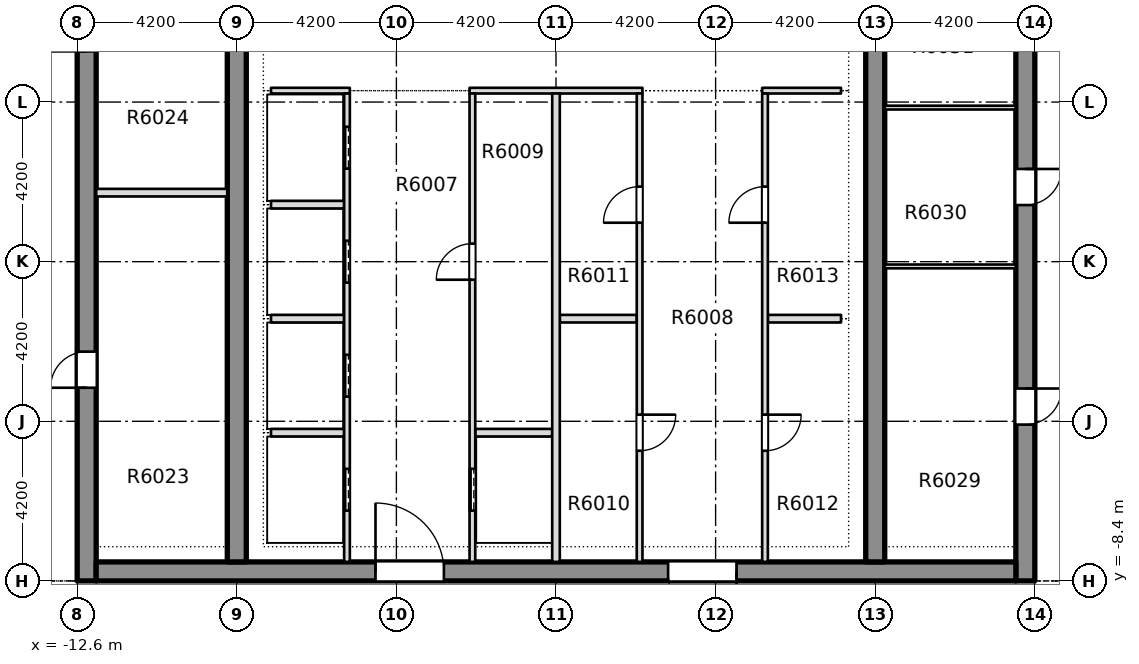
"""IFC4 building model, lengths in metres.
Left out: names, types, materials, properties, quantities, classifications, styles, units other than length and angle.
Written with IfcOpenShell. Run it as: python <this file> out.ifc"""

import sys

from ifc_helpers import new_model, si_unit, direction, frame, frame_2d, origin, place, context, subcontext, project, spatial, rectangle, extrude, element, fill, save


model = new_model("IFC4")
c1 = context("Model", 3, precision=1e-05, world=origin(), true_north=direction((0.0, 1.0)))
c2 = subcontext(c1, "Body", "Model", "MODEL_VIEW")
j1 = project(units=[si_unit("LENGTHUNIT", "METRE"), si_unit("PLANEANGLEUNIT", "RADIAN")], contexts=[c1])
p1 = place(None, origin())
s1 = spatial("IfcSite", under=j1, at=p1, CompositionType="ELEMENT")
p2 = place(p1, origin())
s2 = spatial("IfcBuilding", under=s1, at=p2, CompositionType="ELEMENT")
p3 = place(p2, frame((0.0, 0.0, 230.35)))
s3 = spatial("IfcBuildingStorey", under=s2, at=p3, CompositionType="ELEMENT", Elevation=230.35)
p4 = place(p3, frame((12.35, -8.4, -0.4), z_axis=(0.0, 0.0, 1.0), x_axis=(0.0, 1.0, 0.0)))
e1 = element("IfcWall", 1, at=p4, inside=s3, PredefinedType="SHEAR", context=c2, shape_type="SweptSolid", body=[
    extrude(rectangle(XDim=30.15, YDim=0.5, at=frame_2d((15.075, 0.0))), origin(), (0.0, 0.0, 1.0), 3.45),
])
p5 = place(p4, frame((4.113, 0.0, 0.4)))
e2 = element("IfcOpeningElement", 2, at=p5, cuts=e1, PredefinedType="OPENING", context=c2, shape_type="SweptSolid", body=[
    extrude(rectangle(XDim=0.95, YDim=2.1, at=frame_2d((0.475, 1.05))), frame((0.0, 0.26, 0.0), z_axis=(0.0, -1.0, 0.0), x_axis=(1.0, 0.0, 0.0)), (0.0, 0.0, 1.0), 0.52),
])
p6 = place(p4, frame((9.89, 0.0, 0.4)))
e3 = element("IfcOpeningElement", 3, at=p6, cuts=e1, PredefinedType="OPENING", context=c2, shape_type="SweptSolid", body=[
    extrude(rectangle(XDim=0.95, YDim=2.1, at=frame_2d((0.475, 1.05))), frame((0.0, 0.26, 0.0), z_axis=(0.0, -1.0, 0.0), x_axis=(1.0, 0.0, 0.0)), (0.0, 0.0, 1.0), 0.52),
])
p7 = place(p4, frame((15.052, 0.0, 0.4)))
e4 = element("IfcOpeningElement", 4, at=p7, cuts=e1, PredefinedType="OPENING", context=c2, shape_type="SweptSolid", body=[
    extrude(rectangle(XDim=0.95, YDim=2.1, at=frame_2d((0.475, 1.05))), frame((0.0, 0.26, 0.0), z_axis=(0.0, -1.0, 0.0), x_axis=(1.0, 0.0, 0.0)), (0.0, 0.0, 1.0), 0.52),
])
p8 = place(p4, frame((22.144, 0.0, 0.4)))
e5 = element("IfcOpeningElement", 5, at=p8, cuts=e1, PredefinedType="OPENING", context=c2, shape_type="SweptSolid", body=[
    extrude(rectangle(XDim=0.95, YDim=2.1, at=frame_2d((0.475, 1.05))), frame((0.0, 0.26, 0.0), z_axis=(0.0, -1.0, 0.0), x_axis=(1.0, 0.0, 0.0)), (0.0, 0.0, 1.0), 0.52),
])
p9 = place(p4, frame((24.998, 0.0, 0.4)))
e6 = element("IfcOpeningElement", 6, at=p9, cuts=e1, PredefinedType="OPENING", context=c2, shape_type="SweptSolid", body=[
    extrude(rectangle(XDim=0.95, YDim=2.1, at=frame_2d((0.475, 1.05))), frame((0.0, 0.26, 0.0), z_axis=(0.0, -1.0, 0.0), x_axis=(1.0, 0.0, 0.0)), (0.0, 0.0, 1.0), 0.52),
])
p10 = place(p4, frame((27.605, 0.0, 0.4)))
e7 = element("IfcOpeningElement", 7, at=p10, cuts=e1, PredefinedType="OPENING", context=c2, shape_type="SweptSolid", body=[
    extrude(rectangle(XDim=0.95, YDim=2.1, at=frame_2d((0.475, 1.05))), frame((0.0, 0.26, 0.0), z_axis=(0.0, -1.0, 0.0), x_axis=(1.0, 0.0, 0.0)), (0.0, 0.0, 1.0), 0.52),
])
p11 = place(p4, frame((19.3, 0.0, 0.4)))
e8 = element("IfcOpeningElement", 8, at=p11, cuts=e1, PredefinedType="OPENING", context=c2, shape_type="SweptSolid", body=[
    extrude(rectangle(XDim=1.2, YDim=2.1, at=frame_2d((0.6, 1.05))), frame((0.0, 0.26, 0.0), z_axis=(0.0, -1.0, 0.0), x_axis=(1.0, 0.0, 0.0)), (0.0, 0.0, 1.0), 0.52),
])
p12 = place(p3, frame((-12.35, -8.4, -0.4), z_axis=(0.0, 0.0, 1.0), x_axis=(0.0, 1.0, 0.0)))
e9 = element("IfcWall", 9, at=p12, inside=s3, PredefinedType="SHEAR", context=c2, shape_type="SweptSolid", body=[
    extrude(rectangle(XDim=30.15, YDim=0.5, at=frame_2d((15.075, 0.0))), origin(), (0.0, 0.0, 1.0), 3.45),
])
p13 = place(p12, frame((5.083, 0.0, 0.4)))
e10 = element("IfcOpeningElement", 10, at=p13, cuts=e9, PredefinedType="OPENING", context=c2, shape_type="SweptSolid", body=[
    extrude(rectangle(XDim=0.95, YDim=2.1, at=frame_2d((0.475, 1.05))), frame((0.0, 0.26, 0.0), z_axis=(0.0, -1.0, 0.0), x_axis=(1.0, 0.0, 0.0)), (0.0, 0.0, 1.0), 0.52),
])
p14 = place(p12, frame((13.933, 0.0, 0.4)))
e11 = element("IfcOpeningElement", 11, at=p14, cuts=e9, PredefinedType="OPENING", context=c2, shape_type="SweptSolid", body=[
    extrude(rectangle(XDim=0.95, YDim=2.1, at=frame_2d((0.475, 1.05))), frame((0.0, 0.26, 0.0), z_axis=(0.0, -1.0, 0.0), x_axis=(1.0, 0.0, 0.0)), (0.0, 0.0, 1.0), 0.52),
])
p15 = place(p12, frame((22.719, 0.0, 0.4)))
e12 = element("IfcOpeningElement", 12, at=p15, cuts=e9, PredefinedType="OPENING", context=c2, shape_type="SweptSolid", body=[
    extrude(rectangle(XDim=0.95, YDim=2.1, at=frame_2d((0.475, 1.05))), frame((0.0, 0.26, 0.0), z_axis=(0.0, -1.0, 0.0), x_axis=(1.0, 0.0, 0.0)), (0.0, 0.0, 1.0), 0.52),
])
p16 = place(p12, frame((25.506, 0.0, 0.4)))
e13 = element("IfcOpeningElement", 13, at=p16, cuts=e9, PredefinedType="OPENING", context=c2, shape_type="SweptSolid", body=[
    extrude(rectangle(XDim=0.95, YDim=2.1, at=frame_2d((0.475, 1.05))), frame((0.0, 0.26, 0.0), z_axis=(0.0, -1.0, 0.0), x_axis=(1.0, 0.0, 0.0)), (0.0, 0.0, 1.0), 0.52),
])
p17 = place(p12, frame((27.537, 0.0, 0.4)))
e14 = element("IfcOpeningElement", 14, at=p17, cuts=e9, PredefinedType="OPENING", context=c2, shape_type="SweptSolid", body=[
    extrude(rectangle(XDim=0.95, YDim=2.1, at=frame_2d((0.475, 1.05))), frame((0.0, 0.26, 0.0), z_axis=(0.0, -1.0, 0.0), x_axis=(1.0, 0.0, 0.0)), (0.0, 0.0, 1.0), 0.52),
])
p18 = place(p12, frame((19.3, 0.0, 0.4)))
e15 = element("IfcOpeningElement", 15, at=p18, cuts=e9, PredefinedType="OPENING", context=c2, shape_type="SweptSolid", body=[
    extrude(rectangle(XDim=1.2, YDim=2.1, at=frame_2d((0.6, 1.05))), frame((0.0, 0.26, 0.0), z_axis=(0.0, -1.0, 0.0), x_axis=(1.0, 0.0, 0.0)), (0.0, 0.0, 1.0), 0.52),
])
p19 = place(p3, frame((-12.1, -8.15, -0.4), z_axis=(0.0, 0.0, 1.0), x_axis=(1.0, 0.0, 0.0)))
e16 = element("IfcWall", 16, at=p19, inside=s3, PredefinedType="SHEAR", context=c2, shape_type="SweptSolid", body=[
    extrude(rectangle(XDim=24.2, YDim=0.5, at=frame_2d((12.1, 0.0))), origin(), (0.0, 0.0, 1.0), 3.45),
])
p20 = place(p19, frame((7.35, 0.0, 0.4)))
e17 = element("IfcOpeningElement", 17, at=p20, cuts=e16, PredefinedType="OPENING", context=c2, shape_type="SweptSolid", body=[
    extrude(rectangle(XDim=1.8, YDim=2.1, at=frame_2d((0.9, 1.05))), frame((0.0, 0.26, 0.0), z_axis=(0.0, -1.0, 0.0), x_axis=(1.0, 0.0, 0.0)), (0.0, 0.0, 1.0), 0.52),
])
p21 = place(p19, frame((15.05, 0.0, 0.4)))
e18 = element("IfcOpeningElement", 18, at=p21, cuts=e16, PredefinedType="OPENING", context=c2, shape_type="SweptSolid", body=[
    extrude(rectangle(XDim=1.8, YDim=2.1, at=frame_2d((0.9, 1.05))), frame((0.0, 0.26, 0.0), z_axis=(0.0, -1.0, 0.0), x_axis=(1.0, 0.0, 0.0)), (0.0, 0.0, 1.0), 0.52),
])
p22 = place(p3, frame((-8.4, -7.9, -0.4), z_axis=(0.0, 0.0, 1.0), x_axis=(0.0, 1.0, 0.0)))
e19 = element("IfcWall", 19, at=p22, inside=s3, PredefinedType="SHEAR", context=c2, shape_type="SweptSolid", body=[
    extrude(rectangle(XDim=29.15, YDim=0.5, at=frame_2d((14.575, 0.0))), origin(), (0.0, 0.0, 1.0), 3.45),
])
p23 = place(p22, frame((18.8, 0.0, 0.4)))
e20 = element("IfcOpeningElement", 20, at=p23, cuts=e19, PredefinedType="OPENING", context=c2, shape_type="SweptSolid", body=[
    extrude(rectangle(XDim=1.2, YDim=2.1, at=frame_2d((0.6, 1.05))), frame((0.0, 0.26, 0.0), z_axis=(0.0, -1.0, 0.0), x_axis=(1.0, 0.0, 0.0)), (0.0, 0.0, 1.0), 0.52),
])
p24 = place(p3, frame((8.4, -7.9, -0.4), z_axis=(0.0, 0.0, 1.0), x_axis=(0.0, 1.0, 0.0)))
e21 = element("IfcWall", 21, at=p24, inside=s3, PredefinedType="SHEAR", context=c2, shape_type="SweptSolid", body=[
    extrude(rectangle(XDim=29.15, YDim=0.5, at=frame_2d((14.575, 0.0))), origin(), (0.0, 0.0, 1.0), 3.45),
])
p25 = place(p24, frame((18.8, 0.0, 0.4)))
e22 = element("IfcOpeningElement", 22, at=p25, cuts=e21, PredefinedType="OPENING", context=c2, shape_type="SweptSolid", body=[
    extrude(rectangle(XDim=1.2, YDim=2.1, at=frame_2d((0.6, 1.05))), frame((0.0, 0.26, 0.0), z_axis=(0.0, -1.0, 0.0), x_axis=(1.0, 0.0, 0.0)), (0.0, 0.0, 1.0), 0.52),
])
p26 = place(p3, frame((-7.5, -4.5, 0.0), z_axis=(0.0, 0.0, 1.0), x_axis=(1.0, 0.0, 0.0)))
e23 = element("IfcWall", 23, at=p26, inside=s3, PredefinedType="PARTITIONING", context=c2, shape_type="SweptSolid", body=[
    extrude(rectangle(XDim=1.925, YDim=0.2, at=frame_2d((0.962, 0.0))), origin(), (0.0, 0.0, 1.0), 3.05),
])
p27 = place(p3, frame((-2.125, -4.5, 0.0), z_axis=(0.0, 0.0, 1.0), x_axis=(1.0, 0.0, 0.0)))
e24 = element("IfcWall", 24, at=p27, inside=s3, PredefinedType="PARTITIONING", context=c2, shape_type="SweptSolid", body=[
    extrude(rectangle(XDim=2.025, YDim=0.2, at=frame_2d((1.012, 0.0))), origin(), (0.0, 0.0, 1.0), 3.05),
])
p28 = place(p3, frame((-7.5, -1.5, 0.0), z_axis=(0.0, 0.0, 1.0), x_axis=(1.0, 0.0, 0.0)))
e25 = element("IfcWall", 25, at=p28, inside=s3, PredefinedType="PARTITIONING", context=c2, shape_type="SweptSolid", body=[
    extrude(rectangle(XDim=1.925, YDim=0.2, at=frame_2d((0.962, 0.0))), origin(), (0.0, 0.0, 1.0), 3.05),
])
p29 = place(p3, frame((0.1, -1.5, 0.0), z_axis=(0.0, 0.0, 1.0), x_axis=(1.0, 0.0, 0.0)))
e26 = element("IfcWall", 26, at=p29, inside=s3, PredefinedType="PARTITIONING", context=c2, shape_type="SweptSolid", body=[
    extrude(rectangle(XDim=2.025, YDim=0.2, at=frame_2d((1.012, 0.0))), origin(), (0.0, 0.0, 1.0), 3.05),
])
for number, where, z_axis, x_axis in (
    (27, (5.575, -1.5, 0.0), (0.0, 0.0, 1.0), (1.0, 0.0, 0.0)),
    (28, (-7.5, 1.5, 0.0), (0.0, 0.0, 1.0), (1.0, 0.0, 0.0)),
):
    element("IfcWall", number, at=place(p3, frame(where, z_axis=z_axis, x_axis=x_axis)), inside=s3, PredefinedType="PARTITIONING", context=c2, shape_type="SweptSolid", body=[
        extrude(rectangle(XDim=1.925, YDim=0.2, at=frame_2d((0.962, 0.0))), origin(), (0.0, 0.0, 1.0), 3.05),
    ])
p30 = place(p3, frame((-7.5, 4.5, 0.0), z_axis=(0.0, 0.0, 1.0), x_axis=(1.0, 0.0, 0.0)))
e29 = element("IfcWall", 29, at=p30, inside=s3, PredefinedType="PARTITIONING", context=c2, shape_type="SweptSolid", body=[
    extrude(rectangle(XDim=2.075, YDim=0.15, at=frame_2d((1.038, 0.0))), origin(), (0.0, 0.0, 1.0), 3.05),
])
p31 = place(p3, frame((-2.275, 4.5, 0.0), z_axis=(0.0, 0.0, 1.0), x_axis=(1.0, 0.0, 0.0)))
e30 = element("IfcWall", 30, at=p31, inside=s3, PredefinedType="PARTITIONING", context=c2, shape_type="SweptSolid", body=[
    extrude(rectangle(XDim=4.55, YDim=0.15, at=frame_2d((2.275, 0.0))), origin(), (0.0, 0.0, 1.0), 3.05),
])
p32 = place(p3, frame((5.425, 4.5, 0.0), z_axis=(0.0, 0.0, 1.0), x_axis=(1.0, 0.0, 0.0)))
e31 = element("IfcWall", 31, at=p32, inside=s3, PredefinedType="PARTITIONING", context=c2, shape_type="SweptSolid", body=[
    extrude(rectangle(XDim=2.075, YDim=0.15, at=frame_2d((1.038, 0.0))), origin(), (0.0, 0.0, 1.0), 3.05),
])
p33 = place(p3, frame((-5.5, -7.899, 0.0), z_axis=(0.0, 0.0, 1.0), x_axis=(0.0, 1.0, 0.0)))
e32 = element("IfcWall", 32, at=p33, inside=s3, PredefinedType="PARTITIONING", context=c2, shape_type="SweptSolid", body=[
    extrude(rectangle(XDim=12.324, YDim=0.15, at=frame_2d((6.162, 0.0))), origin(), (0.0, 0.0, 1.0), 3.05),
])
p34 = place(p33, frame((1.349, 0.0, 0.0)))
e33 = element("IfcOpeningElement", 33, at=p34, cuts=e32, PredefinedType="OPENING", context=c2, shape_type="SweptSolid", body=[
    extrude(rectangle(XDim=1.1, YDim=2.1, at=frame_2d((0.55, 1.05))), frame((0.0, 0.085, 0.0), z_axis=(0.0, -1.0, 0.0), x_axis=(1.0, 0.0, 0.0)), (0.0, 0.0, 1.0), 0.17),
])
p35 = place(p33, frame((4.349, 0.0, 0.0)))
e34 = element("IfcOpeningElement", 34, at=p35, cuts=e32, PredefinedType="OPENING", context=c2, shape_type="SweptSolid", body=[
    extrude(rectangle(XDim=1.1, YDim=2.1, at=frame_2d((0.55, 1.05))), frame((0.0, 0.085, 0.0), z_axis=(0.0, -1.0, 0.0), x_axis=(1.0, 0.0, 0.0)), (0.0, 0.0, 1.0), 0.17),
])
p36 = place(p33, frame((7.349, 0.0, 0.0)))
e35 = element("IfcOpeningElement", 35, at=p36, cuts=e32, PredefinedType="OPENING", context=c2, shape_type="SweptSolid", body=[
    extrude(rectangle(XDim=1.1, YDim=2.1, at=frame_2d((0.55, 1.05))), frame((0.0, 0.085, 0.0), z_axis=(0.0, -1.0, 0.0), x_axis=(1.0, 0.0, 0.0)), (0.0, 0.0, 1.0), 0.17),
])
p37 = place(p33, frame((10.349, 0.0, 0.0)))
e36 = element("IfcOpeningElement", 36, at=p37, cuts=e32, PredefinedType="OPENING", context=c2, shape_type="SweptSolid", body=[
    extrude(rectangle(XDim=1.1, YDim=2.1, at=frame_2d((0.55, 1.05))), frame((0.0, 0.085, 0.0), z_axis=(0.0, -1.0, 0.0), x_axis=(1.0, 0.0, 0.0)), (0.0, 0.0, 1.0), 0.17),
])
p38 = place(p3, frame((-2.2, -7.899, 0.0), z_axis=(0.0, 0.0, 1.0), x_axis=(0.0, 1.0, 0.0)))
e37 = element("IfcWall", 37, at=p38, inside=s3, PredefinedType="PARTITIONING", context=c2, shape_type="SweptSolid", body=[
    extrude(rectangle(XDim=12.324, YDim=0.15, at=frame_2d((6.162, 0.0))), origin(), (0.0, 0.0, 1.0), 3.05),
])
p39 = place(p38, frame((1.349, 0.0, 0.0)))
e38 = element("IfcOpeningElement", 38, at=p39, cuts=e37, PredefinedType="OPENING", context=c2, shape_type="SweptSolid", body=[
    extrude(rectangle(XDim=1.1, YDim=2.1, at=frame_2d((0.55, 1.05))), frame((0.0, 0.085, 0.0), z_axis=(0.0, -1.0, 0.0), x_axis=(1.0, 0.0, 0.0)), (0.0, 0.0, 1.0), 0.17),
])
p40 = place(p38, frame((7.424, 0.0, 0.0)))
e39 = element("IfcOpeningElement", 39, at=p40, cuts=e37, PredefinedType="OPENING", context=c2, shape_type="SweptSolid", body=[
    extrude(rectangle(XDim=0.95, YDim=2.1, at=frame_2d((0.475, 1.05))), frame((0.0, 0.085, 0.0), z_axis=(0.0, -1.0, 0.0), x_axis=(1.0, 0.0, 0.0)), (0.0, 0.0, 1.0), 0.17),
])
p41 = place(p3, frame((0.0, -7.899, 0.0), z_axis=(0.0, 0.0, 1.0), x_axis=(0.0, 1.0, 0.0)))
e40 = element("IfcWall", 40, at=p41, inside=s3, PredefinedType="PARTITIONING", context=c2, shape_type="SweptSolid", body=[
    extrude(rectangle(XDim=12.324, YDim=0.2, at=frame_2d((6.162, 0.0))), origin(), (0.0, 0.0, 1.0), 3.05),
])
p42 = place(p3, frame((2.2, -7.899, 0.0), z_axis=(0.0, 0.0, 1.0), x_axis=(0.0, 1.0, 0.0)))
e41 = element("IfcWall", 41, at=p42, inside=s3, PredefinedType="PARTITIONING", context=c2, shape_type="SweptSolid", body=[
    extrude(rectangle(XDim=12.324, YDim=0.15, at=frame_2d((6.162, 0.0))), origin(), (0.0, 0.0, 1.0), 3.05),
])
p43 = place(p42, frame((2.924, 0.0, 0.0)))
e42 = element("IfcOpeningElement", 42, at=p43, cuts=e41, PredefinedType="OPENING", context=c2, shape_type="SweptSolid", body=[
    extrude(rectangle(XDim=0.95, YDim=2.1, at=frame_2d((0.475, 1.05))), frame((0.0, 0.085, 0.0), z_axis=(0.0, -1.0, 0.0), x_axis=(1.0, 0.0, 0.0)), (0.0, 0.0, 1.0), 0.17),
])
p44 = place(p42, frame((8.924, 0.0, 0.0)))
e43 = element("IfcOpeningElement", 43, at=p44, cuts=e41, PredefinedType="OPENING", context=c2, shape_type="SweptSolid", body=[
    extrude(rectangle(XDim=0.95, YDim=2.1, at=frame_2d((0.475, 1.05))), frame((0.0, 0.085, 0.0), z_axis=(0.0, -1.0, 0.0), x_axis=(1.0, 0.0, 0.0)), (0.0, 0.0, 1.0), 0.17),
])
p45 = place(p3, frame((5.5, -7.899, 0.0), z_axis=(0.0, 0.0, 1.0), x_axis=(0.0, 1.0, 0.0)))
e44 = element("IfcWall", 44, at=p45, inside=s3, PredefinedType="PARTITIONING", context=c2, shape_type="SweptSolid", body=[
    extrude(rectangle(XDim=12.324, YDim=0.15, at=frame_2d((6.162, 0.0))), origin(), (0.0, 0.0, 1.0), 3.05),
])
p46 = place(p45, frame((2.924, 0.0, 0.0)))
e45 = element("IfcOpeningElement", 45, at=p46, cuts=e44, PredefinedType="OPENING", context=c2, shape_type="SweptSolid", body=[
    extrude(rectangle(XDim=0.95, YDim=2.1, at=frame_2d((0.475, 1.05))), frame((0.0, 0.085, 0.0), z_axis=(0.0, -1.0, 0.0), x_axis=(1.0, 0.0, 0.0)), (0.0, 0.0, 1.0), 0.17),
])
p47 = place(p45, frame((8.924, 0.0, 0.0)))
e46 = element("IfcOpeningElement", 46, at=p47, cuts=e44, PredefinedType="OPENING", context=c2, shape_type="SweptSolid", body=[
    extrude(rectangle(XDim=0.95, YDim=2.1, at=frame_2d((0.475, 1.05))), frame((0.0, 0.085, 0.0), z_axis=(0.0, -1.0, 0.0), x_axis=(1.0, 0.0, 0.0)), (0.0, 0.0, 1.0), 0.17),
])
p48 = place(p3, frame((-12.099, 1.816, 0.0), z_axis=(0.0, 0.0, 1.0), x_axis=(1.0, 0.0, 0.0)))
e47 = element("IfcWall", 47, at=p48, inside=s3, PredefinedType="PARTITIONING", context=c2, shape_type="SweptSolid", body=[
    extrude(rectangle(XDim=3.448, YDim=0.2, at=frame_2d((1.724, 0.0))), origin(), (0.0, 0.0, 1.0), 3.05),
])
for number, where, z_axis, x_axis in (
    (48, (8.651, -0.125, 0.0), (0.0, 0.0, 1.0), (1.0, 0.0, 0.0)),
    (49, (8.651, 4.054, 0.0), (0.0, 0.0, 1.0), (1.0, 0.0, 0.0)),
):
    element("IfcWall", number, at=place(p3, frame(where, z_axis=z_axis, x_axis=x_axis)), inside=s3, PredefinedType="PARTITIONING", context=c2, shape_type="SweptSolid", body=[
        extrude(rectangle(XDim=3.448, YDim=0.1, at=frame_2d((1.724, 0.0))), origin(), (0.0, 0.0, 1.0), 3.05),
    ])
p49 = place(p34, origin())
e50 = element("IfcDoor", 50, at=p49, inside=s3, OperationType="SLIDING_TO_LEFT", PredefinedType="DOOR", context=c2, shape_type="SweptSolid", body=[
    extrude(rectangle(XDim=1.1, YDim=2.1, at=frame_2d((0.55, 1.05))), frame((0.0, 0.025, 0.0), z_axis=(0.0, -1.0, 0.0), x_axis=(1.0, 0.0, 0.0)), (0.0, 0.0, 1.0), 0.05),
])
fill(e33, e50)
p50 = place(p35, origin())
e51 = element("IfcDoor", 51, at=p50, inside=s3, OperationType="SLIDING_TO_LEFT", PredefinedType="DOOR", context=c2, shape_type="SweptSolid", body=[
    extrude(rectangle(XDim=1.1, YDim=2.1, at=frame_2d((0.55, 1.05))), frame((0.0, 0.025, 0.0), z_axis=(0.0, -1.0, 0.0), x_axis=(1.0, 0.0, 0.0)), (0.0, 0.0, 1.0), 0.05),
])
fill(e34, e51)
p51 = place(p36, origin())
e52 = element("IfcDoor", 52, at=p51, inside=s3, OperationType="SLIDING_TO_LEFT", PredefinedType="DOOR", context=c2, shape_type="SweptSolid", body=[
    extrude(rectangle(XDim=1.1, YDim=2.1, at=frame_2d((0.55, 1.05))), frame((0.0, 0.025, 0.0), z_axis=(0.0, -1.0, 0.0), x_axis=(1.0, 0.0, 0.0)), (0.0, 0.0, 1.0), 0.05),
])
fill(e35, e52)
p52 = place(p37, origin())
e53 = element("IfcDoor", 53, at=p52, inside=s3, OperationType="SLIDING_TO_LEFT", PredefinedType="DOOR", context=c2, shape_type="SweptSolid", body=[
    extrude(rectangle(XDim=1.1, YDim=2.1, at=frame_2d((0.55, 1.05))), frame((0.0, 0.025, 0.0), z_axis=(0.0, -1.0, 0.0), x_axis=(1.0, 0.0, 0.0)), (0.0, 0.0, 1.0), 0.05),
])
fill(e36, e53)
p53 = place(p39, origin())
e54 = element("IfcDoor", 54, at=p53, inside=s3, OperationType="SLIDING_TO_LEFT", PredefinedType="DOOR", context=c2, shape_type="SweptSolid", body=[
    extrude(rectangle(XDim=1.1, YDim=2.1, at=frame_2d((0.55, 1.05))), frame((0.0, 0.025, 0.0), z_axis=(0.0, -1.0, 0.0), x_axis=(1.0, 0.0, 0.0)), (0.0, 0.0, 1.0), 0.05),
])
fill(e38, e54)
p54 = place(p40, origin())
e55 = element("IfcDoor", 55, at=p54, inside=s3, OperationType="SINGLE_SWING_RIGHT", PredefinedType="DOOR", context=c2, shape_type="SweptSolid", body=[
    extrude(rectangle(XDim=0.95, YDim=2.1, at=frame_2d((0.475, 1.05))), frame((0.0, 0.025, 0.0), z_axis=(0.0, -1.0, 0.0), x_axis=(1.0, 0.0, 0.0)), (0.0, 0.0, 1.0), 0.05),
])
fill(e39, e55)
p55 = place(p43, origin())
e56 = element("IfcDoor", 56, at=p55, inside=s3, OperationType="SINGLE_SWING_RIGHT", PredefinedType="DOOR", context=c2, shape_type="SweptSolid", body=[
    extrude(rectangle(XDim=0.95, YDim=2.1, at=frame_2d((0.475, 1.05))), frame((0.0, 0.025, 0.0), z_axis=(0.0, -1.0, 0.0), x_axis=(1.0, 0.0, 0.0)), (0.0, 0.0, 1.0), 0.05),
])
fill(e42, e56)
p56 = place(p44, origin())
e57 = element("IfcDoor", 57, at=p56, inside=s3, OperationType="SINGLE_SWING_RIGHT", PredefinedType="DOOR", context=c2, shape_type="SweptSolid", body=[
    extrude(rectangle(XDim=0.95, YDim=2.1, at=frame_2d((0.475, 1.05))), frame((0.0, 0.025, 0.0), z_axis=(0.0, -1.0, 0.0), x_axis=(1.0, 0.0, 0.0)), (0.0, 0.0, 1.0), 0.05),
])
fill(e43, e57)
p57 = place(p46, origin())
e58 = element("IfcDoor", 58, at=p57, inside=s3, OperationType="SINGLE_SWING_LEFT", PredefinedType="DOOR", context=c2, shape_type="SweptSolid", body=[
    extrude(rectangle(XDim=0.95, YDim=2.1, at=frame_2d((0.475, 1.05))), frame((0.0, 0.025, 0.0), z_axis=(0.0, -1.0, 0.0), x_axis=(1.0, 0.0, 0.0)), (0.0, 0.0, 1.0), 0.05),
])
fill(e45, e58)
p58 = place(p47, origin())
e59 = element("IfcDoor", 59, at=p58, inside=s3, OperationType="SINGLE_SWING_LEFT", PredefinedType="DOOR", context=c2, shape_type="SweptSolid", body=[
    extrude(rectangle(XDim=0.95, YDim=2.1, at=frame_2d((0.475, 1.05))), frame((0.0, 0.025, 0.0), z_axis=(0.0, -1.0, 0.0), x_axis=(1.0, 0.0, 0.0)), (0.0, 0.0, 1.0), 0.05),
])
fill(e46, e59)
p59 = place(p20, origin())
e60 = element("IfcDoor", 60, at=p59, inside=s3, OperationType="SINGLE_SWING_LEFT", PredefinedType="DOOR", context=c2, shape_type="SweptSolid", body=[
    extrude(rectangle(XDim=1.8, YDim=2.1, at=frame_2d((0.9, 1.05))), frame((0.0, 0.025, 0.0), z_axis=(0.0, -1.0, 0.0), x_axis=(1.0, 0.0, 0.0)), (0.0, 0.0, 1.0), 0.05),
])
fill(e17, e60)
p60 = place(p21, origin())
e61 = element("IfcDoor", 61, at=p60, inside=s3, OperationType="SINGLE_SWING_LEFT", PredefinedType="DOOR", context=c2, shape_type="SweptSolid", body=[
    extrude(rectangle(XDim=1.8, YDim=2.1, at=frame_2d((0.9, 1.05))), frame((0.0, 0.025, 0.0), z_axis=(0.0, -1.0, 0.0), x_axis=(1.0, 0.0, 0.0)), (0.0, 0.0, 1.0), 0.05),
])
fill(e18, e61)
p61 = place(p13, origin())
e62 = element("IfcDoor", 62, at=p61, inside=s3, OperationType="SINGLE_SWING_LEFT", PredefinedType="DOOR", context=c2, shape_type="SweptSolid", body=[
    extrude(rectangle(XDim=0.95, YDim=2.1, at=frame_2d((0.475, 1.05))), frame((0.0, 0.025, 0.0), z_axis=(0.0, -1.0, 0.0), x_axis=(1.0, 0.0, 0.0)), (0.0, 0.0, 1.0), 0.05),
])
fill(e10, e62)
p62 = place(p5, origin())
e63 = element("IfcDoor", 63, at=p62, inside=s3, OperationType="SINGLE_SWING_LEFT", PredefinedType="DOOR", context=c2, shape_type="SweptSolid", body=[
    extrude(rectangle(XDim=0.95, YDim=2.1, at=frame_2d((0.475, 1.05))), frame((0.0, 0.025, 0.0), z_axis=(0.0, -1.0, 0.0), x_axis=(1.0, 0.0, 0.0)), (0.0, 0.0, 1.0), 0.05),
])
fill(e2, e63)
p63 = place(p6, origin())
e64 = element("IfcDoor", 64, at=p63, inside=s3, OperationType="SINGLE_SWING_LEFT", PredefinedType="DOOR", context=c2, shape_type="SweptSolid", body=[
    extrude(rectangle(XDim=0.95, YDim=2.1, at=frame_2d((0.475, 1.05))), frame((0.0, 0.025, 0.0), z_axis=(0.0, -1.0, 0.0), x_axis=(1.0, 0.0, 0.0)), (0.0, 0.0, 1.0), 0.05),
])
fill(e3, e64)
save(model, sys.argv[1])
